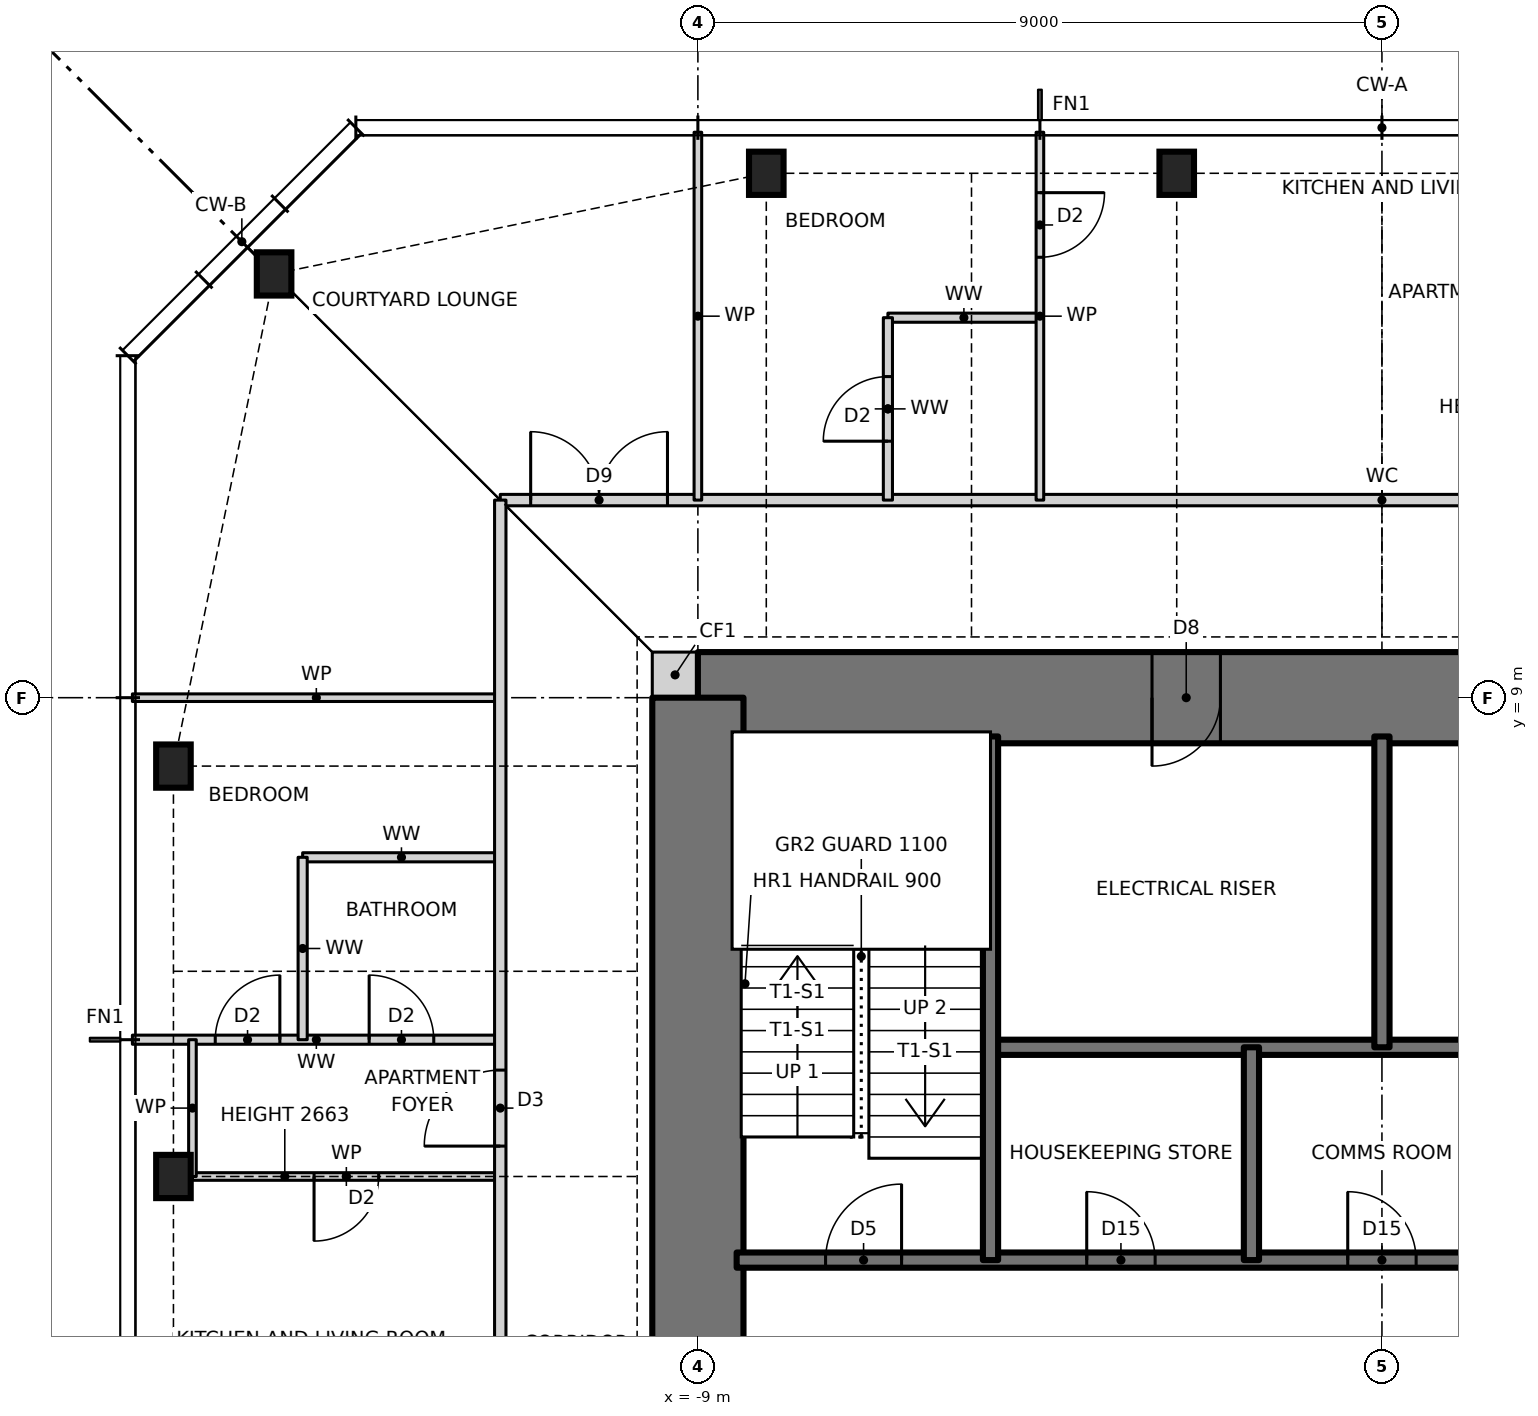
"""IFC4 building model, lengths in metres.
Left out: names, types, materials, properties, quantities, classifications, styles, units other than length and angle.
Written with IfcOpenShell. Run it as: python <this file> out.ifc"""

import sys

from ifc_helpers import new_model, si_unit, direction, frame, frame_2d, origin, origin_2d, place, context, subcontext, project, spatial, rectangle, i_section, extrude, element, fill, save


model = new_model("IFC4")
c1 = context("Model", 3, precision=1e-05, world=origin(), true_north=direction((0.0, 1.0)))
c2 = subcontext(c1, "Body", "Model", "MODEL_VIEW")
j1 = project(units=[si_unit("LENGTHUNIT", "METRE"), si_unit("PLANEANGLEUNIT", "RADIAN")], contexts=[c1])
p1 = place(None, origin())
s1 = spatial("IfcSite", under=j1, at=p1, CompositionType="ELEMENT")
p2 = place(p1, origin())
s2 = spatial("IfcBuilding", under=s1, at=p2, CompositionType="ELEMENT")
p3 = place(p2, frame((0.0, 0.0, 239.5)))
s3 = spatial("IfcBuildingStorey", under=s2, at=p3, CompositionType="ELEMENT", Elevation=239.5)
for number, where, z_axis, x_axis in (
    (1, (-2.7, 15.9, 0.0), (0.0, 0.0, 1.0), (1.0, 0.0, 0.0)),
    (2, (-8.1, 15.9, 0.0), (0.0, 0.0, 1.0), (1.0, 0.0, 0.0)),
    (3, (-14.576, 14.576, 0.0), (0.0, 0.0, 1.0), (1.0, 0.0, 0.0)),
    (4, (-15.9, 8.1, 0.0), (0.0, 0.0, 1.0), (1.0, 0.0, 0.0)),
    (5, (-15.9, 2.7, 0.0), (0.0, 0.0, 1.0), (1.0, 0.0, 0.0)),
):
    element("IfcColumn", number, at=place(p3, frame(where, z_axis=z_axis, x_axis=x_axis)), inside=s3, PredefinedType="COLUMN", context=c2, shape_type="SweptSolid", body=[
        extrude(i_section(OverallWidth=0.455, OverallDepth=0.569, WebThickness=0.078, FlangeThickness=0.125, at=origin_2d()), origin(), (0.0, 0.0, 1.0), 3.5),
    ])
p4 = place(p3, frame((-9.6, 9.3, 0.0), z_axis=(0.0, 0.0, 1.0), x_axis=(1.0, 0.0, 0.0)))
e6 = element("IfcWall", 6, at=p4, inside=s3, PredefinedType="SOLIDWALL", context=c2, shape_type="SweptSolid", body=[
    extrude(rectangle(XDim=0.6, YDim=0.6, at=frame_2d((0.3, 0.0))), origin(), (0.0, 0.0, 1.0), 3.5),
])
p5 = place(p3, frame((9.0, 9.0, 0.0), z_axis=(0.0, 0.0, 1.0), x_axis=(-1.0, 0.0, 0.0)))
e7 = element("IfcWall", 7, at=p5, inside=s3, PredefinedType="SHEAR", context=c2, shape_type="SweptSolid", body=[
    extrude(rectangle(XDim=18.0, YDim=1.2, at=frame_2d((9.0, 0.0))), origin(), (0.0, 0.0, 1.0), 3.5),
])
p6 = place(p5, frame((11.125, 0.0, 0.0)))
e8 = element("IfcOpeningElement", 8, at=p6, cuts=e7, PredefinedType="OPENING", context=c2, shape_type="SweptSolid", body=[
    extrude(rectangle(XDim=0.9, YDim=2.1, at=frame_2d((0.45, 1.05))), frame((0.0, 0.61, 0.0), z_axis=(0.0, -1.0, 0.0), x_axis=(1.0, 0.0, 0.0)), (0.0, 0.0, 1.0), 1.22),
])
p7 = place(p5, frame((4.275, 0.0, 0.0)))
e9 = element("IfcOpeningElement", 9, at=p7, cuts=e7, PredefinedType="OPENING", context=c2, shape_type="SweptSolid", body=[
    extrude(rectangle(XDim=0.9, YDim=2.1, at=frame_2d((0.45, 1.05))), frame((0.0, 0.61, 0.0), z_axis=(0.0, -1.0, 0.0), x_axis=(1.0, 0.0, 0.0)), (0.0, 0.0, 1.0), 1.22),
])
p8 = place(p3, frame((-9.0, 9.0, 0.0), z_axis=(0.0, 0.0, 1.0), x_axis=(0.0, -1.0, 0.0)))
e10 = element("IfcWall", 10, at=p8, inside=s3, PredefinedType="SHEAR", context=c2, shape_type="SweptSolid", body=[
    extrude(rectangle(XDim=18.0, YDim=1.2, at=frame_2d((9.0, 0.0))), origin(), (0.0, 0.0, 1.0), 3.5),
])
p9 = place(p8, frame((8.5, 0.0, 0.0)))
e11 = element("IfcOpeningElement", 11, at=p9, cuts=e10, PredefinedType="OPENING", context=c2, shape_type="SweptSolid", body=[
    extrude(rectangle(XDim=1.0, YDim=2.1, at=frame_2d((0.5, 1.05))), frame((0.0, 0.61, 0.0), z_axis=(0.0, -1.0, 0.0), x_axis=(1.0, 0.0, 0.0)), (0.0, 0.0, 1.0), 1.22),
])
p10 = place(p3, frame((-8.49, 1.6, 0.0), z_axis=(0.0, 0.0, 1.0), x_axis=(1.0, 0.0, 0.0)))
e12 = element("IfcWall", 12, at=p10, inside=s3, PredefinedType="SOLIDWALL", context=c2, shape_type="SweptSolid", body=[
    extrude(rectangle(XDim=16.98, YDim=0.2, at=frame_2d((8.49, 0.0))), origin(), (0.0, 0.0, 1.0), 3.5),
])
p11 = place(p10, frame((1.17, 0.0, 0.0)))
e13 = element("IfcOpeningElement", 13, at=p11, cuts=e12, PredefinedType="OPENING", context=c2, shape_type="SweptSolid", body=[
    extrude(rectangle(XDim=1.0, YDim=2.1, at=frame_2d((0.5, 1.05))), frame((0.0, 0.11, 0.0), z_axis=(0.0, -1.0, 0.0), x_axis=(1.0, 0.0, 0.0)), (0.0, 0.0, 1.0), 0.22),
])
p12 = place(p10, frame((4.606, 0.0, 0.0)))
e14 = element("IfcOpeningElement", 14, at=p12, cuts=e12, PredefinedType="OPENING", context=c2, shape_type="SweptSolid", body=[
    extrude(rectangle(XDim=0.9, YDim=2.1, at=frame_2d((0.45, 1.05))), frame((0.0, 0.11, 0.0), z_axis=(0.0, -1.0, 0.0), x_axis=(1.0, 0.0, 0.0)), (0.0, 0.0, 1.0), 0.22),
])
p13 = place(p10, frame((8.04, 0.0, 0.0)))
e15 = element("IfcOpeningElement", 15, at=p13, cuts=e12, PredefinedType="OPENING", context=c2, shape_type="SweptSolid", body=[
    extrude(rectangle(XDim=0.9, YDim=2.1, at=frame_2d((0.45, 1.05))), frame((0.0, 0.11, 0.0), z_axis=(0.0, -1.0, 0.0), x_axis=(1.0, 0.0, 0.0)), (0.0, 0.0, 1.0), 0.22),
])
p14 = place(p10, frame((11.374, 0.0, 0.0)))
e16 = element("IfcOpeningElement", 16, at=p14, cuts=e12, PredefinedType="OPENING", context=c2, shape_type="SweptSolid", body=[
    extrude(rectangle(XDim=1.1, YDim=2.1, at=frame_2d((0.55, 1.05))), frame((0.0, 0.11, 0.0), z_axis=(0.0, -1.0, 0.0), x_axis=(1.0, 0.0, 0.0)), (0.0, 0.0, 1.0), 0.22),
])
p15 = place(p10, frame((14.66, 0.0, 0.0)))
e17 = element("IfcOpeningElement", 17, at=p15, cuts=e12, PredefinedType="OPENING", context=c2, shape_type="SweptSolid", body=[
    extrude(rectangle(XDim=1.3, YDim=2.1, at=frame_2d((0.65, 1.05))), frame((0.0, 0.11, 0.0), z_axis=(0.0, -1.0, 0.0), x_axis=(1.0, 0.0, 0.0)), (0.0, 0.0, 1.0), 0.22),
])
p16 = place(p3, frame((-15.65, 2.7, 0.0), z_axis=(0.0, 0.0, 1.0), x_axis=(1.0, 0.0, 0.0)))
e18 = element("IfcWall", 18, at=p16, inside=s3, PredefinedType="PARTITIONING", context=c2, shape_type="SweptSolid", body=[
    extrude(rectangle(XDim=4.05, YDim=0.1, at=frame_2d((2.025, 0.0))), origin(), (0.0, 0.0, 1.0), 2.663),
])
p17 = place(p16, frame((1.6, 0.0, 0.0)))
e19 = element("IfcOpeningElement", 19, at=p17, cuts=e18, PredefinedType="OPENING", context=c2, shape_type="SweptSolid", body=[
    extrude(rectangle(XDim=0.85, YDim=2.1, at=frame_2d((0.425, 1.05))), frame((0.0, 0.06, 0.0), z_axis=(0.0, -1.0, 0.0), x_axis=(1.0, 0.0, 0.0)), (0.0, 0.0, 1.0), 0.12),
])
p18 = place(p3, frame((-5.15, 4.4, 0.0), z_axis=(0.0, 0.0, 1.0), x_axis=(1.0, 0.0, 0.0)))
e20 = element("IfcWall", 20, at=p18, inside=s3, PredefinedType="SOLIDWALL", context=c2, shape_type="SweptSolid", body=[
    extrude(rectangle(XDim=10.3, YDim=0.2, at=frame_2d((5.15, 0.0))), origin(), (0.0, 0.0, 1.0), 3.5),
])
p19 = place(p3, frame((-16.44, 4.5, 0.0), z_axis=(0.0, 0.0, 1.0), x_axis=(1.0, 0.0, 0.0)))
e21 = element("IfcWall", 21, at=p19, inside=s3, PredefinedType="PARTITIONING", context=c2, shape_type="SweptSolid", body=[
    extrude(rectangle(XDim=4.84, YDim=0.12, at=frame_2d((2.42, 0.0))), origin(), (0.0, 0.0, 1.0), 3.27),
])
p20 = place(p19, frame((1.09, 0.0, 0.0)))
e22 = element("IfcOpeningElement", 22, at=p20, cuts=e21, PredefinedType="OPENING", context=c2, shape_type="SweptSolid", body=[
    extrude(rectangle(XDim=0.85, YDim=2.1, at=frame_2d((0.425, 1.05))), frame((0.0, 0.07, 0.0), z_axis=(0.0, -1.0, 0.0), x_axis=(1.0, 0.0, 0.0)), (0.0, 0.0, 1.0), 0.14),
])
p21 = place(p19, frame((3.115, 0.0, 0.0)))
e23 = element("IfcOpeningElement", 23, at=p21, cuts=e21, PredefinedType="OPENING", context=c2, shape_type="SweptSolid", body=[
    extrude(rectangle(XDim=0.85, YDim=2.1, at=frame_2d((0.425, 1.05))), frame((0.0, 0.07, 0.0), z_axis=(0.0, -1.0, 0.0), x_axis=(1.0, 0.0, 0.0)), (0.0, 0.0, 1.0), 0.14),
])
p22 = place(p3, frame((-14.2, 6.9, 0.0), z_axis=(0.0, 0.0, 1.0), x_axis=(1.0, 0.0, 0.0)))
e24 = element("IfcWall", 24, at=p22, inside=s3, PredefinedType="PARTITIONING", context=c2, shape_type="SweptSolid", body=[
    extrude(rectangle(XDim=2.6, YDim=0.12, at=frame_2d((1.3, 0.0))), origin(), (0.0, 0.0, 1.0), 3.27),
])
p23 = place(p3, frame((-16.44, 9.0, 0.0), z_axis=(0.0, 0.0, 1.0), x_axis=(1.0, 0.0, 0.0)))
e25 = element("IfcWall", 25, at=p23, inside=s3, PredefinedType="PARTITIONING", context=c2, shape_type="SweptSolid", body=[
    extrude(rectangle(XDim=4.84, YDim=0.1, at=frame_2d((2.42, 0.0))), origin(), (0.0, 0.0, 1.0), 3.27),
])
p24 = place(p3, frame((-11.6, 11.6, 0.0), z_axis=(0.0, 0.0, 1.0), x_axis=(1.0, 0.0, 0.0)))
e26 = element("IfcWall", 26, at=p24, inside=s3, PredefinedType="PARTITIONING", context=c2, shape_type="SweptSolid", body=[
    extrude(rectangle(XDim=23.2, YDim=0.15, at=frame_2d((11.6, 0.0))), origin(), (0.0, 0.0, 1.0), 3.27),
])
p25 = place(p24, frame((14.7, 0.0, 0.0)))
e27 = element("IfcOpeningElement", 27, at=p25, cuts=e26, PredefinedType="OPENING", context=c2, shape_type="SweptSolid", body=[
    extrude(rectangle(XDim=1.0, YDim=2.1, at=frame_2d((0.5, 1.05))), frame((0.0, 0.085, 0.0), z_axis=(0.0, -1.0, 0.0), x_axis=(1.0, 0.0, 0.0)), (0.0, 0.0, 1.0), 0.17),
])
p26 = place(p24, frame((0.4, 0.0, 0.0)))
e28 = element("IfcOpeningElement", 28, at=p26, cuts=e26, PredefinedType="OPENING", context=c2, shape_type="SweptSolid", body=[
    extrude(rectangle(XDim=1.8, YDim=2.1, at=frame_2d((0.9, 1.05))), frame((0.0, 0.085, 0.0), z_axis=(0.0, -1.0, 0.0), x_axis=(1.0, 0.0, 0.0)), (0.0, 0.0, 1.0), 0.17),
])
p27 = place(p3, frame((-6.5, 14.0, 0.0), z_axis=(0.0, 0.0, 1.0), x_axis=(1.0, 0.0, 0.0)))
e29 = element("IfcWall", 29, at=p27, inside=s3, PredefinedType="PARTITIONING", context=c2, shape_type="SweptSolid", body=[
    extrude(rectangle(XDim=2.0, YDim=0.12, at=frame_2d((1.0, 0.0))), origin(), (0.0, 0.0, 1.0), 3.27),
])
p28 = place(p3, frame((0.0, 4.4, 0.0), z_axis=(0.0, 0.0, 1.0), x_axis=(0.0, 1.0, 0.0)))
e30 = element("IfcWall", 30, at=p28, inside=s3, PredefinedType="SOLIDWALL", context=c2, shape_type="SweptSolid", body=[
    extrude(rectangle(XDim=4.09, YDim=0.2, at=frame_2d((2.045, 0.0))), origin(), (0.0, 0.0, 1.0), 3.5),
])
p29 = place(p3, frame((-1.717, 1.6, 0.0), z_axis=(0.0, 0.0, 1.0), x_axis=(0.0, 1.0, 0.0)))
e31 = element("IfcWall", 31, at=p29, inside=s3, PredefinedType="SOLIDWALL", context=c2, shape_type="SweptSolid", body=[
    extrude(rectangle(XDim=2.8, YDim=0.2, at=frame_2d((1.4, 0.0))), origin(), (0.0, 0.0, 1.0), 3.5),
])
p30 = place(p3, frame((-4.5, 11.6, 0.0), z_axis=(0.0, 0.0, 1.0), x_axis=(0.0, 1.0, 0.0)))
e32 = element("IfcWall", 32, at=p30, inside=s3, PredefinedType="PARTITIONING", context=c2, shape_type="SweptSolid", body=[
    extrude(rectangle(XDim=4.84, YDim=0.1, at=frame_2d((2.42, 0.0))), origin(), (0.0, 0.0, 1.0), 3.27),
])
p31 = place(p30, frame((3.195, 0.0, 0.0)))
e33 = element("IfcOpeningElement", 33, at=p31, cuts=e32, PredefinedType="OPENING", context=c2, shape_type="SweptSolid", body=[
    extrude(rectangle(XDim=0.85, YDim=2.1, at=frame_2d((0.425, 1.05))), frame((0.0, 0.06, 0.0), z_axis=(0.0, -1.0, 0.0), x_axis=(1.0, 0.0, 0.0)), (0.0, 0.0, 1.0), 0.12),
])
p32 = place(p3, frame((-5.15, 1.6, 0.0), z_axis=(0.0, 0.0, 1.0), x_axis=(0.0, 1.0, 0.0)))
e34 = element("IfcWall", 34, at=p32, inside=s3, PredefinedType="SOLIDWALL", context=c2, shape_type="SweptSolid", body=[
    extrude(rectangle(XDim=6.89, YDim=0.2, at=frame_2d((3.445, 0.0))), origin(), (0.0, 0.0, 1.0), 3.5),
])
p33 = place(p3, frame((-6.5, 11.6, 0.0), z_axis=(0.0, 0.0, 1.0), x_axis=(0.0, 1.0, 0.0)))
e35 = element("IfcWall", 35, at=p33, inside=s3, PredefinedType="PARTITIONING", context=c2, shape_type="SweptSolid", body=[
    extrude(rectangle(XDim=2.4, YDim=0.12, at=frame_2d((1.2, 0.0))), origin(), (0.0, 0.0, 1.0), 3.27),
])
p34 = place(p33, frame((0.775, 0.0, 0.0)))
e36 = element("IfcOpeningElement", 36, at=p34, cuts=e35, PredefinedType="OPENING", context=c2, shape_type="SweptSolid", body=[
    extrude(rectangle(XDim=0.85, YDim=2.1, at=frame_2d((0.425, 1.05))), frame((0.0, 0.07, 0.0), z_axis=(0.0, -1.0, 0.0), x_axis=(1.0, 0.0, 0.0)), (0.0, 0.0, 1.0), 0.14),
])
p35 = place(p3, frame((-9.0, 11.6, 0.0), z_axis=(0.0, 0.0, 1.0), x_axis=(0.0, 1.0, 0.0)))
e37 = element("IfcWall", 37, at=p35, inside=s3, PredefinedType="PARTITIONING", context=c2, shape_type="SweptSolid", body=[
    extrude(rectangle(XDim=4.84, YDim=0.1, at=frame_2d((2.42, 0.0))), origin(), (0.0, 0.0, 1.0), 3.27),
])
p36 = place(p3, frame((-11.6, -11.6, 0.0), z_axis=(0.0, 0.0, 1.0), x_axis=(0.0, 1.0, 0.0)))
e38 = element("IfcWall", 38, at=p36, inside=s3, PredefinedType="PARTITIONING", context=c2, shape_type="SweptSolid", body=[
    extrude(rectangle(XDim=23.2, YDim=0.15, at=frame_2d((11.6, 0.0))), origin(), (0.0, 0.0, 1.0), 3.27),
])
p37 = place(p36, frame((14.7, 0.0, 0.0)))
e39 = element("IfcOpeningElement", 39, at=p37, cuts=e38, PredefinedType="OPENING", context=c2, shape_type="SweptSolid", body=[
    extrude(rectangle(XDim=1.0, YDim=2.1, at=frame_2d((0.5, 1.05))), frame((0.0, 0.085, 0.0), z_axis=(0.0, -1.0, 0.0), x_axis=(1.0, 0.0, 0.0)), (0.0, 0.0, 1.0), 0.17),
])
p38 = place(p36, frame((0.875, 0.0, 0.0)))
e40 = element("IfcOpeningElement", 40, at=p38, cuts=e38, PredefinedType="OPENING", context=c2, shape_type="SweptSolid", body=[
    extrude(rectangle(XDim=0.85, YDim=2.1, at=frame_2d((0.425, 1.05))), frame((0.0, 0.085, 0.0), z_axis=(0.0, -1.0, 0.0), x_axis=(1.0, 0.0, 0.0)), (0.0, 0.0, 1.0), 0.17),
])
p39 = place(p3, frame((-14.2, 4.5, 0.0), z_axis=(0.0, 0.0, 1.0), x_axis=(0.0, 1.0, 0.0)))
e41 = element("IfcWall", 41, at=p39, inside=s3, PredefinedType="PARTITIONING", context=c2, shape_type="SweptSolid", body=[
    extrude(rectangle(XDim=2.4, YDim=0.12, at=frame_2d((1.2, 0.0))), origin(), (0.0, 0.0, 1.0), 3.27),
])
p40 = place(p3, frame((-15.65, 2.7, 0.0), z_axis=(0.0, 0.0, 1.0), x_axis=(0.0, 1.0, 0.0)))
e42 = element("IfcWall", 42, at=p40, inside=s3, PredefinedType="PARTITIONING", context=c2, shape_type="SweptSolid", body=[
    extrude(rectangle(XDim=1.8, YDim=0.1, at=frame_2d((0.9, 0.0))), origin(), (0.0, 0.0, 1.0), 3.27),
])
p41 = place(p11, origin())
e43 = element("IfcDoor", 43, at=p41, inside=s3, OperationType="SINGLE_SWING_RIGHT", PredefinedType="DOOR", context=c2, shape_type="SweptSolid", body=[
    extrude(rectangle(XDim=1.0, YDim=2.1, at=frame_2d((0.5, 1.05))), frame((0.0, 0.025, 0.0), z_axis=(0.0, -1.0, 0.0), x_axis=(1.0, 0.0, 0.0)), (0.0, 0.0, 1.0), 0.05),
])
fill(e13, e43)
p42 = place(p12, origin())
e44 = element("IfcDoor", 44, at=p42, inside=s3, OperationType="SINGLE_SWING_LEFT", PredefinedType="DOOR", context=c2, shape_type="SweptSolid", body=[
    extrude(rectangle(XDim=0.9, YDim=2.1, at=frame_2d((0.45, 1.05))), frame((0.0, 0.025, 0.0), z_axis=(0.0, -1.0, 0.0), x_axis=(1.0, 0.0, 0.0)), (0.0, 0.0, 1.0), 0.05),
])
fill(e14, e44)
p43 = place(p13, origin())
e45 = element("IfcDoor", 45, at=p43, inside=s3, OperationType="SINGLE_SWING_LEFT", PredefinedType="DOOR", context=c2, shape_type="SweptSolid", body=[
    extrude(rectangle(XDim=0.9, YDim=2.1, at=frame_2d((0.45, 1.05))), frame((0.0, 0.025, 0.0), z_axis=(0.0, -1.0, 0.0), x_axis=(1.0, 0.0, 0.0)), (0.0, 0.0, 1.0), 0.05),
])
fill(e15, e45)
p44 = place(p31, frame((0.85, 0.0, 0.0), z_axis=(0.0, 0.0, 1.0), x_axis=(-1.0, 0.0, 0.0)))
e46 = element("IfcDoor", 46, at=p44, inside=s3, OperationType="SINGLE_SWING_LEFT", PredefinedType="DOOR", context=c2, shape_type="SweptSolid", body=[
    extrude(rectangle(XDim=0.85, YDim=2.1, at=frame_2d((0.425, 1.05))), frame((0.0, 0.025, 0.0), z_axis=(0.0, -1.0, 0.0), x_axis=(1.0, 0.0, 0.0)), (0.0, 0.0, 1.0), 0.05),
])
fill(e33, e46)
p45 = place(p34, origin())
e47 = element("IfcDoor", 47, at=p45, inside=s3, OperationType="SINGLE_SWING_LEFT", PredefinedType="DOOR", context=c2, shape_type="SweptSolid", body=[
    extrude(rectangle(XDim=0.85, YDim=2.1, at=frame_2d((0.425, 1.05))), frame((0.0, 0.025, 0.0), z_axis=(0.0, -1.0, 0.0), x_axis=(1.0, 0.0, 0.0)), (0.0, 0.0, 1.0), 0.05),
])
fill(e36, e47)
p46 = place(p37, origin())
e48 = element("IfcDoor", 48, at=p46, inside=s3, OperationType="SINGLE_SWING_LEFT", PredefinedType="DOOR", context=c2, shape_type="SweptSolid", body=[
    extrude(rectangle(XDim=1.0, YDim=2.1, at=frame_2d((0.5, 1.05))), frame((0.0, 0.025, 0.0), z_axis=(0.0, -1.0, 0.0), x_axis=(1.0, 0.0, 0.0)), (0.0, 0.0, 1.0), 0.05),
])
fill(e39, e48)
p47 = place(p17, frame((0.85, 0.0, 0.0), z_axis=(0.0, 0.0, 1.0), x_axis=(-1.0, 0.0, 0.0)))
e49 = element("IfcDoor", 49, at=p47, inside=s3, OperationType="SINGLE_SWING_RIGHT", PredefinedType="DOOR", context=c2, shape_type="SweptSolid", body=[
    extrude(rectangle(XDim=0.85, YDim=2.1, at=frame_2d((0.425, 1.05))), frame((0.0, 0.025, 0.0), z_axis=(0.0, -1.0, 0.0), x_axis=(1.0, 0.0, 0.0)), (0.0, 0.0, 1.0), 0.05),
])
fill(e19, e49)
p48 = place(p20, origin())
e50 = element("IfcDoor", 50, at=p48, inside=s3, OperationType="SINGLE_SWING_RIGHT", PredefinedType="DOOR", context=c2, shape_type="SweptSolid", body=[
    extrude(rectangle(XDim=0.85, YDim=2.1, at=frame_2d((0.425, 1.05))), frame((0.0, 0.025, 0.0), z_axis=(0.0, -1.0, 0.0), x_axis=(1.0, 0.0, 0.0)), (0.0, 0.0, 1.0), 0.05),
])
fill(e22, e50)
p49 = place(p21, origin())
e51 = element("IfcDoor", 51, at=p49, inside=s3, OperationType="SINGLE_SWING_LEFT", PredefinedType="DOOR", context=c2, shape_type="SweptSolid", body=[
    extrude(rectangle(XDim=0.85, YDim=2.1, at=frame_2d((0.425, 1.05))), frame((0.0, 0.025, 0.0), z_axis=(0.0, -1.0, 0.0), x_axis=(1.0, 0.0, 0.0)), (0.0, 0.0, 1.0), 0.05),
])
fill(e23, e51)
p50 = place(p26, origin())
e52 = element("IfcDoor", 52, at=p50, inside=s3, OperationType="DOUBLE_DOOR_SINGLE_SWING", PredefinedType="DOOR", context=c2, shape_type="SweptSolid", body=[
    extrude(rectangle(XDim=1.8, YDim=2.1, at=frame_2d((0.9, 1.05))), frame((0.0, 0.025, 0.0), z_axis=(0.0, -1.0, 0.0), x_axis=(1.0, 0.0, 0.0)), (0.0, 0.0, 1.0), 0.05),
])
fill(e28, e52)
p51 = place(p6, origin())
e53 = element("IfcDoor", 53, at=p51, inside=s3, OperationType="SINGLE_SWING_RIGHT", PredefinedType="DOOR", context=c2, shape_type="SweptSolid", body=[
    extrude(rectangle(XDim=0.9, YDim=2.1, at=frame_2d((0.45, 1.05))), frame((0.0, 0.025, 0.0), z_axis=(0.0, -1.0, 0.0), x_axis=(1.0, 0.0, 0.0)), (0.0, 0.0, 1.0), 0.05),
])
fill(e8, e53)
save(model, sys.argv[1])
